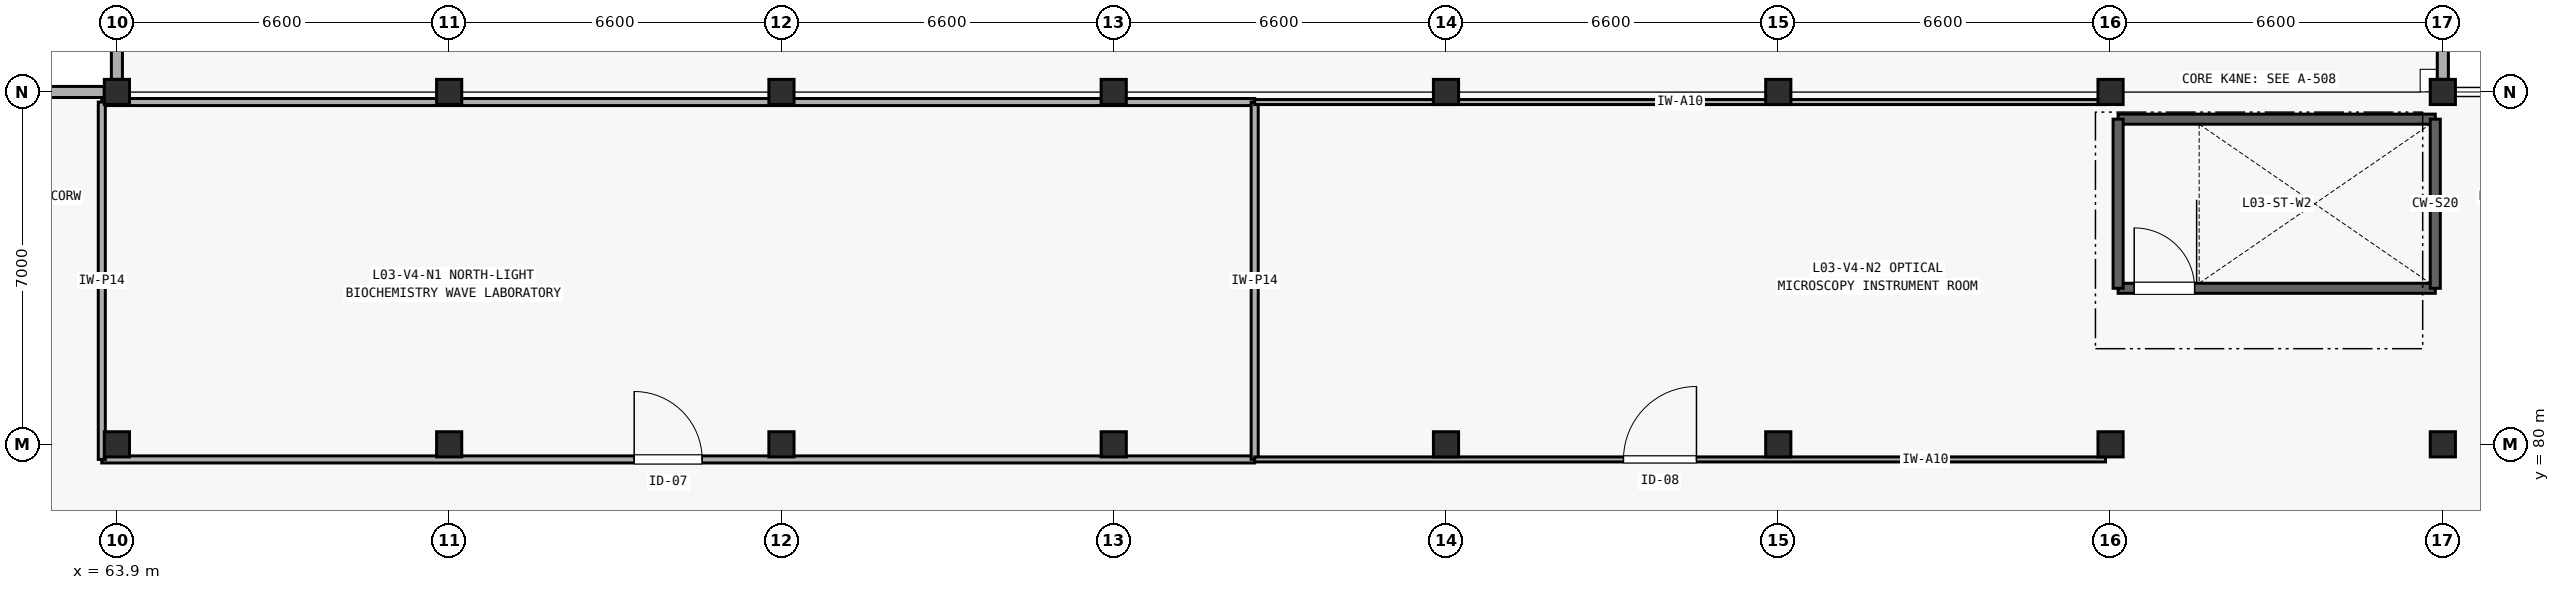
"""IFC4 building model, lengths in metres.
Left out: names, types, materials, properties, quantities, classifications, styles, units other than length and angle.
Written with IfcOpenShell. Run it as: python <this file> out.ifc"""

import sys

from ifc_helpers import new_model, si_unit, direction, frame, frame_2d, origin, origin_2d, place, context, subcontext, project, spatial, rectangle, extrude, element, fill, save


model = new_model("IFC4")
c1 = context("Model", 3, precision=1e-05, world=origin(), true_north=direction((0.0, 1.0)))
c2 = subcontext(c1, "Body", "Model", "MODEL_VIEW")
j1 = project(units=[si_unit("LENGTHUNIT", "METRE"), si_unit("PLANEANGLEUNIT", "RADIAN")], contexts=[c1])
p1 = place(None, origin())
s1 = spatial("IfcSite", under=j1, at=p1, CompositionType="ELEMENT")
p2 = place(p1, origin())
s2 = spatial("IfcBuilding", under=s1, at=p2, CompositionType="ELEMENT")
p3 = place(p2, frame((0.0, 0.0, 12.6)))
s3 = spatial("IfcBuildingStorey", under=s2, at=p3, CompositionType="ELEMENT", Elevation=12.6)
for number, where, z_axis, x_axis in (
    (1, (63.9, 80.0, 0.0), (0.0, 0.0, 1.0), (1.0, 0.0, 0.0)),
    (2, (63.9, 87.0, 0.0), (0.0, 0.0, 1.0), (1.0, 0.0, 0.0)),
    (3, (70.5, 80.0, 0.0), (0.0, 0.0, 1.0), (1.0, 0.0, 0.0)),
    (4, (70.5, 87.0, 0.0), (0.0, 0.0, 1.0), (1.0, 0.0, 0.0)),
    (5, (77.1, 80.0, 0.0), (0.0, 0.0, 1.0), (1.0, 0.0, 0.0)),
    (6, (77.1, 87.0, 0.0), (0.0, 0.0, 1.0), (1.0, 0.0, 0.0)),
    (7, (83.7, 80.0, 0.0), (0.0, 0.0, 1.0), (1.0, 0.0, 0.0)),
    (8, (83.7, 87.0, 0.0), (0.0, 0.0, 1.0), (1.0, 0.0, 0.0)),
    (9, (90.3, 80.0, 0.0), (0.0, 0.0, 1.0), (1.0, 0.0, 0.0)),
    (10, (90.3, 87.0, 0.0), (0.0, 0.0, 1.0), (1.0, 0.0, 0.0)),
    (11, (96.9, 80.0, 0.0), (0.0, 0.0, 1.0), (1.0, 0.0, 0.0)),
    (12, (96.9, 87.0, 0.0), (0.0, 0.0, 1.0), (1.0, 0.0, 0.0)),
    (13, (103.5, 80.0, 0.0), (0.0, 0.0, 1.0), (1.0, 0.0, 0.0)),
    (14, (103.5, 87.0, 0.0), (0.0, 0.0, 1.0), (1.0, 0.0, 0.0)),
    (15, (110.1, 80.0, 0.0), (0.0, 0.0, 1.0), (1.0, 0.0, 0.0)),
    (16, (110.1, 87.0, 0.0), (0.0, 0.0, 1.0), (1.0, 0.0, 0.0)),
):
    element("IfcColumn", number, at=place(p3, frame(where, z_axis=z_axis, x_axis=x_axis)), inside=s3, PredefinedType="COLUMN", context=c2, shape_type="SweptSolid", body=[
        extrude(rectangle(XDim=0.5, YDim=0.5, at=origin_2d()), origin(), (0.0, 0.0, 1.0), 4.2),
    ])
p4 = place(p3, frame((57.55, 87.0, 0.0), z_axis=(0.0, 0.0, 1.0), x_axis=(1.0, 0.0, 0.0)))
e17 = element("IfcWall", 17, at=p4, inside=s3, PredefinedType="SOLIDWALL", context=c2, shape_type="SweptSolid", body=[
    extrude(rectangle(XDim=6.1, YDim=0.22, at=frame_2d((3.05, 0.0))), origin(), (0.0, 0.0, 1.0), 3.405),
])
p5 = place(p4, frame((1.35, 0.0, 0.85)))
e18 = element("IfcOpeningElement", 18, at=p5, cuts=e17, PredefinedType="OPENING", context=c2, shape_type="SweptSolid", body=[
    extrude(rectangle(XDim=3.4, YDim=1.2, at=frame_2d((1.7, 0.6))), frame((0.0, 0.12, 0.0), z_axis=(0.0, -1.0, 0.0), x_axis=(1.0, 0.0, 0.0)), (0.0, 0.0, 1.0), 0.24),
])
p6 = place(p3, frame((63.9, 87.25, 0.0), z_axis=(0.0, 0.0, 1.0), x_axis=(0.0, 1.0, 0.0)))
e19 = element("IfcWall", 19, at=p6, inside=s3, PredefinedType="SOLIDWALL", context=c2, shape_type="SweptSolid", body=[
    extrude(rectangle(XDim=6.5, YDim=0.22, at=frame_2d((3.25, 0.0))), origin(), (0.0, 0.0, 1.0), 3.325),
])
p7 = place(p6, frame((2.425, 0.0, 0.85)))
e20 = element("IfcOpeningElement", 20, at=p7, cuts=e19, PredefinedType="OPENING", context=c2, shape_type="SweptSolid", body=[
    extrude(rectangle(XDim=1.65, YDim=1.35, at=frame_2d((0.825, 0.675))), frame((0.0, 0.12, 0.0), z_axis=(0.0, -1.0, 0.0), x_axis=(1.0, 0.0, 0.0)), (0.0, 0.0, 1.0), 0.24),
])
p8 = place(p3, frame((110.1, 87.25, 0.0), z_axis=(0.0, 0.0, 1.0), x_axis=(0.0, 1.0, 0.0)))
e21 = element("IfcWall", 21, at=p8, inside=s3, PredefinedType="SOLIDWALL", context=c2, shape_type="SweptSolid", body=[
    extrude(rectangle(XDim=6.5, YDim=0.22, at=frame_2d((3.25, 0.0))), origin(), (0.0, 0.0, 1.0), 3.325),
])
p9 = place(p8, frame((2.05, 0.0, 0.85)))
e22 = element("IfcOpeningElement", 22, at=p9, cuts=e21, PredefinedType="OPENING", context=c2, shape_type="SweptSolid", body=[
    extrude(rectangle(XDim=2.4, YDim=1.5, at=frame_2d((1.2, 0.75))), frame((0.0, 0.12, 0.0), z_axis=(0.0, -1.0, 0.0), x_axis=(1.0, 0.0, 0.0)), (0.0, 0.0, 1.0), 0.24),
])
p10 = place(p3, frame((103.65, 83.1, 0.0), z_axis=(0.0, 0.0, 1.0), x_axis=(1.0, 0.0, 0.0)))
e23 = element("IfcWall", 23, at=p10, inside=s3, PredefinedType="SHEAR", context=c2, shape_type="SweptSolid", body=[
    extrude(rectangle(XDim=6.3, YDim=0.2, at=frame_2d((3.15, 0.0))), origin(), (0.0, 0.0, 1.0), 4.2),
])
p11 = place(p10, frame((0.32, 0.0, 0.0)))
e24 = element("IfcOpeningElement", 24, at=p11, cuts=e23, PredefinedType="OPENING", context=c2, shape_type="SweptSolid", body=[
    extrude(rectangle(XDim=1.2, YDim=2.15, at=frame_2d((0.6, 1.075))), frame((0.0, 0.11, 0.0), z_axis=(0.0, -1.0, 0.0), x_axis=(1.0, 0.0, 0.0)), (0.0, 0.0, 1.0), 0.22),
])
p12 = place(p3, frame((103.65, 86.46, 0.0), z_axis=(0.0, 0.0, 1.0), x_axis=(1.0, 0.0, 0.0)))
e25 = element("IfcWall", 25, at=p12, inside=s3, PredefinedType="SHEAR", context=c2, shape_type="SweptSolid", body=[
    extrude(rectangle(XDim=6.3, YDim=0.2, at=frame_2d((3.15, 0.0))), origin(), (0.0, 0.0, 1.0), 4.2),
])
for number, where, z_axis, x_axis in (
    (26, (103.65, 83.1, 0.0), (0.0, 0.0, 1.0), (0.0, 1.0, 0.0)),
    (27, (109.95, 83.1, 0.0), (0.0, 0.0, 1.0), (0.0, 1.0, 0.0)),
):
    element("IfcWall", number, at=place(p3, frame(where, z_axis=z_axis, x_axis=x_axis)), inside=s3, PredefinedType="SHEAR", context=c2, shape_type="SweptSolid", body=[
        extrude(rectangle(XDim=3.36, YDim=0.2, at=frame_2d((1.68, 0.0))), origin(), (0.0, 0.0, 1.0), 4.2),
    ])
p13 = place(p3, frame((63.6, 79.7, 0.0), z_axis=(0.0, 0.0, 1.0), x_axis=(1.0, 0.0, 0.0)))
e28 = element("IfcWall", 28, at=p13, inside=s3, PredefinedType="PLUMBINGWALL", context=c2, shape_type="SweptSolid", body=[
    extrude(rectangle(XDim=22.9, YDim=0.14, at=frame_2d((11.45, 0.0))), origin(), (0.0, 0.0, 1.0), 3.405),
])
p14 = place(p13, frame((10.575, 0.0, 0.0)))
e29 = element("IfcOpeningElement", 29, at=p14, cuts=e28, PredefinedType="OPENING", context=c2, shape_type="SweptSolid", body=[
    extrude(rectangle(XDim=1.35, YDim=2.2, at=frame_2d((0.675, 1.1))), frame((0.0, 0.08, 0.0), z_axis=(0.0, -1.0, 0.0), x_axis=(1.0, 0.0, 0.0)), (0.0, 0.0, 1.0), 0.16),
])
p15 = place(p3, frame((63.6, 86.8, 0.0), z_axis=(0.0, 0.0, 1.0), x_axis=(1.0, 0.0, 0.0)))
e30 = element("IfcWall", 30, at=p15, inside=s3, PredefinedType="PLUMBINGWALL", context=c2, shape_type="SweptSolid", body=[
    extrude(rectangle(XDim=22.9, YDim=0.14, at=frame_2d((11.45, 0.0))), origin(), (0.0, 0.0, 1.0), 3.405),
])
for number, where, z_axis, x_axis in (
    (31, (63.6, 79.7, 0.0), (0.0, 0.0, 1.0), (0.0, 1.0, 0.0)),
    (32, (86.5, 79.7, 0.0), (0.0, 0.0, 1.0), (0.0, 1.0, 0.0)),
):
    element("IfcWall", number, at=place(p3, frame(where, z_axis=z_axis, x_axis=x_axis)), inside=s3, PredefinedType="PLUMBINGWALL", context=c2, shape_type="SweptSolid", body=[
        extrude(rectangle(XDim=7.1, YDim=0.14, at=frame_2d((3.55, 0.0))), origin(), (0.0, 0.0, 1.0), 3.9),
    ])
p16 = place(p3, frame((86.5, 79.7, 0.0), z_axis=(0.0, 0.0, 1.0), x_axis=(1.0, 0.0, 0.0)))
e33 = element("IfcWall", 33, at=p16, inside=s3, PredefinedType="PARTITIONING", context=c2, shape_type="SweptSolid", body=[
    extrude(rectangle(XDim=16.9, YDim=0.1, at=frame_2d((8.45, 0.0))), origin(), (0.0, 0.0, 1.0), 3.405),
])
p17 = place(p16, frame((7.325, 0.0, 0.0)))
e34 = element("IfcOpeningElement", 34, at=p17, cuts=e33, PredefinedType="OPENING", context=c2, shape_type="SweptSolid", body=[
    extrude(rectangle(XDim=1.45, YDim=2.2, at=frame_2d((0.725, 1.1))), frame((0.0, 0.06, 0.0), z_axis=(0.0, -1.0, 0.0), x_axis=(1.0, 0.0, 0.0)), (0.0, 0.0, 1.0), 0.12),
])
p18 = place(p3, frame((86.5, 86.8, 0.0), z_axis=(0.0, 0.0, 1.0), x_axis=(1.0, 0.0, 0.0)))
e35 = element("IfcWall", 35, at=p18, inside=s3, PredefinedType="PARTITIONING", context=c2, shape_type="SweptSolid", body=[
    extrude(rectangle(XDim=16.9, YDim=0.1, at=frame_2d((8.45, 0.0))), origin(), (0.0, 0.0, 1.0), 3.405),
])
p19 = place(p11, origin())
e36 = element("IfcDoor", 36, at=p19, inside=s3, OperationType="SINGLE_SWING_LEFT", PredefinedType="DOOR", context=c2, shape_type="SweptSolid", body=[
    extrude(rectangle(XDim=1.2, YDim=2.15, at=frame_2d((0.6, 1.075))), frame((0.0, 0.025, 0.0), z_axis=(0.0, -1.0, 0.0), x_axis=(1.0, 0.0, 0.0)), (0.0, 0.0, 1.0), 0.05),
])
fill(e24, e36)
p20 = place(p14, origin())
e37 = element("IfcDoor", 37, at=p20, inside=s3, OperationType="SINGLE_SWING_LEFT", PredefinedType="DOOR", context=c2, shape_type="SweptSolid", body=[
    extrude(rectangle(XDim=1.35, YDim=2.2, at=frame_2d((0.675, 1.1))), frame((0.0, 0.025, 0.0), z_axis=(0.0, -1.0, 0.0), x_axis=(1.0, 0.0, 0.0)), (0.0, 0.0, 1.0), 0.05),
])
fill(e29, e37)
p21 = place(p17, origin())
e38 = element("IfcDoor", 38, at=p21, inside=s3, OperationType="SINGLE_SWING_RIGHT", PredefinedType="DOOR", context=c2, shape_type="SweptSolid", body=[
    extrude(rectangle(XDim=1.45, YDim=2.2, at=frame_2d((0.725, 1.1))), frame((0.0, 0.025, 0.0), z_axis=(0.0, -1.0, 0.0), x_axis=(1.0, 0.0, 0.0)), (0.0, 0.0, 1.0), 0.05),
])
fill(e34, e38)
save(model, sys.argv[1])
